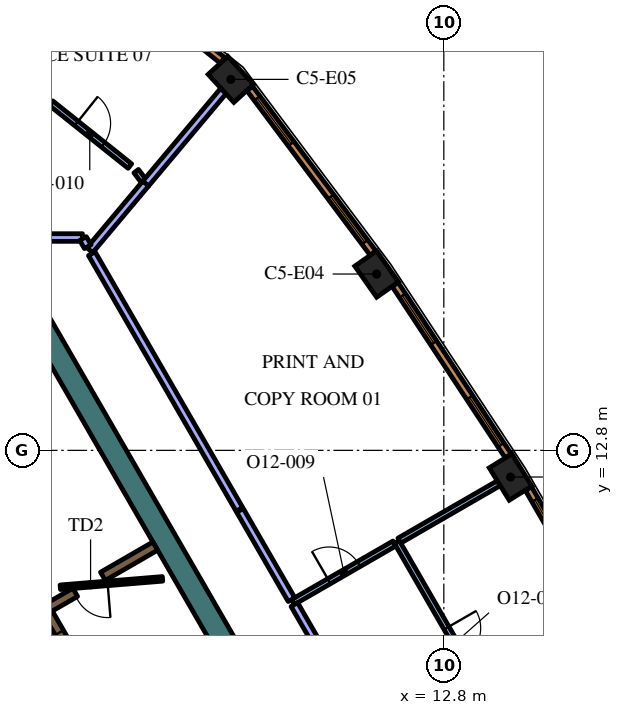
"""IFC4 building model, lengths in metres.
Left out: names, types, materials, properties, quantities, classifications, styles, units other than length and angle.
Written with IfcOpenShell. Run it as: python <this file> out.ifc"""

import sys

from ifc_helpers import new_model, si_unit, direction, frame, frame_2d, origin, origin_2d, place, context, subcontext, project, spatial, rectangle, extrude, element, fill, save


model = new_model("IFC4")
c1 = context("Model", 3, precision=1e-05, world=origin(), true_north=direction((0.0, 1.0)))
c2 = subcontext(c1, "Body", "Model", "MODEL_VIEW")
j1 = project(units=[si_unit("LENGTHUNIT", "METRE"), si_unit("PLANEANGLEUNIT", "RADIAN")], contexts=[c1])
p1 = place(None, origin())
s1 = spatial("IfcSite", under=j1, at=p1, CompositionType="ELEMENT")
p2 = place(p1, origin())
s2 = spatial("IfcBuilding", under=s1, at=p2, CompositionType="ELEMENT")
p3 = place(p2, frame((0.0, 0.0, 279.6)))
s3 = spatial("IfcBuildingStorey", under=s2, at=p3, CompositionType="ELEMENT", Elevation=279.6)
for number, where, z_axis, x_axis in (
    (1, (14.556, 12.098, 0.0), (0.0, 0.0, 1.0), (-0.526, 0.851, 0.0)),
    (2, (11.032, 17.44, 0.0), (0.0, 0.0, 1.0), (-0.575, 0.818, 0.0)),
    (3, (7.195, 22.561, 0.0), (0.0, 0.0, 1.0), (-0.676, 0.737, 0.0)),
):
    element("IfcColumn", number, at=place(p3, frame(where, z_axis=z_axis, x_axis=x_axis)), inside=s3, PredefinedType="COLUMN", context=c2, shape_type="SweptSolid", body=[
        extrude(rectangle(XDim=1.0, YDim=0.7, at=origin_2d()), origin(), (0.0, 0.0, 1.0), 4.2),
    ])
p4 = place(p3, frame((1.989, 16.456, 0.0), z_axis=(0.0, 0.0, 1.0), x_axis=(0.49999102663, -0.8660305845, 0.0)))
e4 = element("IfcWall", 4, at=p4, inside=s3, PredefinedType="SOLIDWALL", context=c2, shape_type="SweptSolid", body=[
    extrude(rectangle(XDim=12.406, YDim=0.6, at=frame_2d((6.203, 0.0))), origin(), (0.0, 0.0, 1.0), 4.2),
])
p5 = place(p3, frame((3.1, 9.064, 0.0), z_axis=(0.0, 0.0, 1.0), x_axis=(-0.866033137035, -0.499986605379, 0.0)))
e5 = element("IfcWall", 5, at=p5, inside=s3, PredefinedType="SOLIDWALL", context=c2, shape_type="SweptSolid", body=[
    extrude(rectangle(XDim=3.467, YDim=0.25, at=frame_2d((1.733, 0.0))), origin(), (0.0, 0.0, 1.0), 4.2),
])
p6 = place(p3, frame((3.83, 9.486, 0.0), z_axis=(0.0, 0.0, 1.0), x_axis=(0.865986202621, 0.500067892261, 0.0)))
e6 = element("IfcWall", 6, at=p6, inside=s3, PredefinedType="SOLIDWALL", context=c2, shape_type="SweptSolid", body=[
    extrude(rectangle(XDim=1.591, YDim=0.25, at=frame_2d((0.795, 0.0))), origin(), (0.0, 0.0, 1.0), 4.2),
])
p7 = place(p3, frame((8.565, -2.185, 0.0), z_axis=(0.0, 0.0, 1.0), x_axis=(-0.499997954832, 0.866026584559, 0.0)))
e7 = element("IfcWall", 7, at=p7, inside=s3, PredefinedType="SOLIDWALL", context=c2, shape_type="SweptSolid", body=[
    extrude(rectangle(XDim=12.35, YDim=0.25, at=frame_2d((6.175, 0.0))), origin(), (0.0, 0.0, 1.0), 4.2),
])
p8 = place(p7, frame((0.685, 0.0, 0.0)))
e8 = element("IfcOpeningElement", 8, at=p8, cuts=e7, PredefinedType="OPENING", context=c2, shape_type="SweptSolid", body=[
    extrude(rectangle(XDim=0.9, YDim=2.1, at=frame_2d((0.45, 1.05))), frame((0.0, 0.135, 0.0), z_axis=(0.0, -1.0, 0.0), x_axis=(1.0, 0.0, 0.0)), (0.0, 0.0, 1.0), 0.27),
])
p9 = place(p7, frame((3.105, 0.0, 0.0)))
e9 = element("IfcOpeningElement", 9, at=p9, cuts=e7, PredefinedType="OPENING", context=c2, shape_type="SweptSolid", body=[
    extrude(rectangle(XDim=1.1, YDim=2.1, at=frame_2d((0.55, 1.05))), frame((0.0, 0.135, 0.0), z_axis=(0.0, -1.0, 0.0), x_axis=(1.0, 0.0, 0.0)), (0.0, 0.0, 1.0), 0.27),
])
p10 = place(p7, frame((5.625, 0.0, 0.0)))
e10 = element("IfcOpeningElement", 10, at=p10, cuts=e7, PredefinedType="OPENING", context=c2, shape_type="SweptSolid", body=[
    extrude(rectangle(XDim=1.1, YDim=2.1, at=frame_2d((0.55, 1.05))), frame((0.0, 0.135, 0.0), z_axis=(0.0, -1.0, 0.0), x_axis=(1.0, 0.0, 0.0)), (0.0, 0.0, 1.0), 0.27),
])
p11 = place(p7, frame((8.145, 0.0, 0.0)))
e11 = element("IfcOpeningElement", 11, at=p11, cuts=e7, PredefinedType="OPENING", context=c2, shape_type="SweptSolid", body=[
    extrude(rectangle(XDim=1.1, YDim=2.1, at=frame_2d((0.55, 1.05))), frame((0.0, 0.135, 0.0), z_axis=(0.0, -1.0, 0.0), x_axis=(1.0, 0.0, 0.0)), (0.0, 0.0, 1.0), 0.27),
])
p12 = place(p7, frame((10.665, 0.0, 0.0)))
e12 = element("IfcOpeningElement", 12, at=p12, cuts=e7, PredefinedType="OPENING", context=c2, shape_type="SweptSolid", body=[
    extrude(rectangle(XDim=1.1, YDim=2.1, at=frame_2d((0.55, 1.05))), frame((0.0, 0.135, 0.0), z_axis=(0.0, -1.0, 0.0), x_axis=(1.0, 0.0, 0.0)), (0.0, 0.0, 1.0), 0.27),
])
p13 = place(p3, frame((5.398, 9.419, 0.0), z_axis=(0.0, 0.0, 1.0), x_axis=(-0.996653416376, -0.081743303248, 0.0)))
e13 = element("IfcWall", 13, at=p13, inside=s3, PredefinedType="PARTITIONING", context=c2, shape_type="SweptSolid", body=[
    extrude(rectangle(XDim=2.7, YDim=0.12, at=frame_2d((1.35, 0.0))), origin(), (0.0, 0.0, 1.0), 3.55),
])
p14 = place(p13, frame((1.45, 0.0, 0.0)))
e14 = element("IfcOpeningElement", 14, at=p14, cuts=e13, PredefinedType="OPENING", context=c2, shape_type="SweptSolid", body=[
    extrude(rectangle(XDim=0.9, YDim=2.1, at=frame_2d((0.45, 1.05))), frame((0.0, 0.07, 0.0), z_axis=(0.0, -1.0, 0.0), x_axis=(1.0, 0.0, 0.0)), (0.0, 0.0, 1.0), 0.14),
])
p15 = place(p3, frame((11.564, 10.387, 0.0), z_axis=(0.0, 0.0, 1.0), x_axis=(0.500002559113, -0.866023926275, 0.0)))
e15 = element("IfcWall", 15, at=p15, inside=s3, PredefinedType="PARTITIONING", context=c2, shape_type="SweptSolid", body=[
    extrude(rectangle(XDim=6.212, YDim=0.15, at=frame_2d((3.106, 0.0))), origin(), (0.0, 0.0, 1.0), 3.55),
])
p16 = place(p15, frame((2.612, 0.0, 0.0)))
e16 = element("IfcOpeningElement", 16, at=p16, cuts=e15, PredefinedType="OPENING", context=c2, shape_type="SweptSolid", body=[
    extrude(rectangle(XDim=0.9, YDim=2.1, at=frame_2d((0.45, 1.05))), frame((0.0, 0.085, 0.0), z_axis=(0.0, -1.0, 0.0), x_axis=(1.0, 0.0, 0.0)), (0.0, 0.0, 1.0), 0.17),
])
p17 = place(p3, frame((11.629, 10.424, 0.0), z_axis=(0.0, 0.0, 1.0), x_axis=(0.866061796884, 0.499936960004, 0.0)))
e17 = element("IfcWall", 17, at=p17, inside=s3, PredefinedType="PARTITIONING", context=c2, shape_type="SweptSolid", body=[
    extrude(rectangle(XDim=3.021, YDim=0.15, at=frame_2d((1.511, 0.0))), origin(), (0.0, 0.0, 1.0), 3.55),
])
p18 = place(p3, frame((8.829, 8.808, 0.0), z_axis=(0.0, 0.0, 1.0), x_axis=(0.866041857893, 0.499971499565, 0.0)))
e18 = element("IfcWall", 18, at=p18, inside=s3, PredefinedType="PARTITIONING", context=c2, shape_type="SweptSolid", body=[
    extrude(rectangle(XDim=3.083, YDim=0.15, at=frame_2d((1.542, 0.0))), origin(), (0.0, 0.0, 1.0), 3.55),
])
p19 = place(p18, frame((1.1, 0.0, 0.0)))
e19 = element("IfcOpeningElement", 19, at=p19, cuts=e18, PredefinedType="OPENING", context=c2, shape_type="SweptSolid", body=[
    extrude(rectangle(XDim=0.9, YDim=2.1, at=frame_2d((0.45, 1.05))), frame((0.0, 0.085, 0.0), z_axis=(0.0, -1.0, 0.0), x_axis=(1.0, 0.0, 0.0)), (0.0, 0.0, 1.0), 0.17),
])
p20 = place(p3, frame((13.436, 0.829, 0.0), z_axis=(0.0, 0.0, 1.0), x_axis=(-0.499983789798, 0.866034762547, 0.0)))
e20 = element("IfcWall", 20, at=p20, inside=s3, PredefinedType="PARTITIONING", context=c2, shape_type="SweptSolid", body=[
    extrude(rectangle(XDim=9.138, YDim=0.2, at=frame_2d((4.569, 0.0))), origin(), (0.0, 0.0, 1.0), 3.55),
])
p21 = place(p3, frame((4.95, 19.814, 0.0), z_axis=(0.0, 0.0, 1.0), x_axis=(0.642981953866, 0.765881326971, 0.0)))
e21 = element("IfcWall", 21, at=p21, inside=s3, PredefinedType="PARTITIONING", context=c2, shape_type="SweptSolid", body=[
    extrude(rectangle(XDim=3.188, YDim=0.2, at=frame_2d((1.594, 0.0))), origin(), (0.0, 0.0, 1.0), 3.55),
])
p22 = place(p3, frame((3.483, 18.067, 0.0), z_axis=(0.0, 0.0, 1.0), x_axis=(0.642896944312, 0.765952687177, 0.0)))
e22 = element("IfcWall", 22, at=p22, inside=s3, PredefinedType="PARTITIONING", context=c2, shape_type="SweptSolid", body=[
    extrude(rectangle(XDim=2.29, YDim=0.2, at=frame_2d((1.145, 0.0))), origin(), (0.0, 0.0, 1.0), 3.55),
])
p23 = place(p3, frame((8.792, 8.873, 0.0), z_axis=(0.0, 0.0, 1.0), x_axis=(-0.499992600721, 0.866029675718, 0.0)))
e23 = element("IfcWall", 23, at=p23, inside=s3, PredefinedType="PARTITIONING", context=c2, shape_type="SweptSolid", body=[
    extrude(rectangle(XDim=2.712, YDim=0.2, at=frame_2d((1.356, 0.0))), origin(), (0.0, 0.0, 1.0), 3.55),
])
p24 = place(p3, frame((7.421, 11.247, 0.0), z_axis=(0.0, 0.0, 1.0), x_axis=(-0.499999024953, 0.866025966727, 0.0)))
e24 = element("IfcWall", 24, at=p24, inside=s3, PredefinedType="PARTITIONING", context=c2, shape_type="SweptSolid", body=[
    extrude(rectangle(XDim=7.769, YDim=0.2, at=frame_2d((3.884, 0.0))), origin(), (0.0, 0.0, 1.0), 3.55),
])
p25 = place(p3, frame((4.891, 19.899, 0.0), z_axis=(0.0, 0.0, 1.0), x_axis=(-0.6, 0.8, 0.0)))
e25 = element("IfcWall", 25, at=p25, inside=s3, PredefinedType="PARTITIONING", context=c2, shape_type="SweptSolid", body=[
    extrude(rectangle(XDim=0.309, YDim=0.15, at=frame_2d((0.154, 0.0))), origin(), (0.0, 0.0, 1.0), 3.55),
])
p26 = place(p3, frame((2.462, 21.937, 0.0), z_axis=(0.0, 0.0, 1.0), x_axis=(0.781630346222, -0.62374193531, 0.0)))
e26 = element("IfcWall", 26, at=p26, inside=s3, PredefinedType="PARTITIONING", context=c2, shape_type="SweptSolid", body=[
    extrude(rectangle(XDim=2.656, YDim=0.15, at=frame_2d((1.328, 0.0))), origin(), (0.0, 0.0, 1.0), 3.55),
])
p27 = place(p26, frame((0.857, 0.0, 0.0)))
e27 = element("IfcOpeningElement", 27, at=p27, cuts=e26, PredefinedType="OPENING", context=c2, shape_type="SweptSolid", body=[
    extrude(rectangle(XDim=0.9, YDim=2.1, at=frame_2d((0.45, 1.05))), frame((0.0, 0.085, 0.0), z_axis=(0.0, -1.0, 0.0), x_axis=(1.0, 0.0, 0.0)), (0.0, 0.0, 1.0), 0.17),
])
p28 = place(p3, frame((3.291, 18.4, 0.0), z_axis=(0.0, 0.0, 1.0), x_axis=(-1.0, 0.0, 0.0)))
e28 = element("IfcWall", 28, at=p28, inside=s3, PredefinedType="PARTITIONING", context=c2, shape_type="SweptSolid", body=[
    extrude(rectangle(XDim=6.582, YDim=0.2, at=frame_2d((3.291, 0.0))), origin(), (0.0, 0.0, 1.0), 3.55),
])
p29 = place(p3, frame((3.43, 18.159, 0.0), z_axis=(0.0, 0.0, 1.0), x_axis=(-0.499949632511, 0.866054481515, 0.0)))
e29 = element("IfcWall", 29, at=p29, inside=s3, PredefinedType="PARTITIONING", context=c2, shape_type="SweptSolid", body=[
    extrude(rectangle(XDim=0.248, YDim=0.2, at=frame_2d((0.124, 0.0))), origin(), (0.0, 0.0, 1.0), 3.55),
])
p30 = place(p3, frame((17.728, 7.114, 0.0), z_axis=(0.0, 0.0, 1.0), x_axis=(-0.500024767483, 0.866011103799, 0.0)))
e30 = element("IfcWall", 30, at=p30, inside=s3, PredefinedType="SOLIDWALL", context=c2, shape_type="SweptSolid", body=[
    extrude(rectangle(XDim=5.406, YDim=0.19, at=frame_2d((2.703, 0.0))), origin(), (0.0, 0.0, 1.0), 3.95),
])
p31 = place(p30, frame((0.346, 0.0, 0.6)))
e31 = element("IfcOpeningElement", 31, at=p31, cuts=e30, PredefinedType="OPENING", context=c2, shape_type="SweptSolid", body=[
    extrude(rectangle(XDim=1.5, YDim=2.85, at=frame_2d((0.75, 1.425))), frame((0.0, 0.105, 0.0), z_axis=(0.0, -1.0, 0.0), x_axis=(1.0, 0.0, 0.0)), (0.0, 0.0, 1.0), 0.21),
])
p32 = place(p30, frame((3.56, 0.0, 0.6)))
e32 = element("IfcOpeningElement", 32, at=p32, cuts=e30, PredefinedType="OPENING", context=c2, shape_type="SweptSolid", body=[
    extrude(rectangle(XDim=1.5, YDim=2.85, at=frame_2d((0.75, 1.425))), frame((0.0, 0.105, 0.0), z_axis=(0.0, -1.0, 0.0), x_axis=(1.0, 0.0, 0.0)), (0.0, 0.0, 1.0), 0.21),
])
p33 = place(p3, frame((14.496, 12.653, 0.0), z_axis=(0.0, 0.0, 1.0), x_axis=(-0.550744054781, 0.83467417962, 0.0)))
e33 = element("IfcWall", 33, at=p33, inside=s3, PredefinedType="SOLIDWALL", context=c2, shape_type="SweptSolid", body=[
    extrude(rectangle(XDim=5.406, YDim=0.19, at=frame_2d((2.703, 0.0))), origin(), (0.0, 0.0, 1.0), 3.95),
])
p34 = place(p33, frame((0.346, 0.0, 0.6)))
e34 = element("IfcOpeningElement", 34, at=p34, cuts=e33, PredefinedType="OPENING", context=c2, shape_type="SweptSolid", body=[
    extrude(rectangle(XDim=1.5, YDim=2.85, at=frame_2d((0.75, 1.425))), frame((0.0, 0.105, 0.0), z_axis=(0.0, -1.0, 0.0), x_axis=(1.0, 0.0, 0.0)), (0.0, 0.0, 1.0), 0.21),
])
p35 = place(p33, frame((3.559, 0.0, 0.6)))
e35 = element("IfcOpeningElement", 35, at=p35, cuts=e33, PredefinedType="OPENING", context=c2, shape_type="SweptSolid", body=[
    extrude(rectangle(XDim=1.5, YDim=2.85, at=frame_2d((0.75, 1.425))), frame((0.0, 0.105, 0.0), z_axis=(0.0, -1.0, 0.0), x_axis=(1.0, 0.0, 0.0)), (0.0, 0.0, 1.0), 0.21),
])
p36 = place(p3, frame((10.938, 17.99, 0.0), z_axis=(0.0, 0.0, 1.0), x_axis=(-0.599559865294, 0.800329911929, 0.0)))
e36 = element("IfcWall", 36, at=p36, inside=s3, PredefinedType="SOLIDWALL", context=c2, shape_type="SweptSolid", body=[
    extrude(rectangle(XDim=5.415, YDim=0.19, at=frame_2d((2.708, 0.0))), origin(), (0.0, 0.0, 1.0), 3.95),
])
p37 = place(p36, frame((0.358, 0.0, 0.6)))
e37 = element("IfcOpeningElement", 37, at=p37, cuts=e36, PredefinedType="OPENING", context=c2, shape_type="SweptSolid", body=[
    extrude(rectangle(XDim=1.5, YDim=2.85, at=frame_2d((0.75, 1.425))), frame((0.0, 0.105, 0.0), z_axis=(0.0, -1.0, 0.0), x_axis=(1.0, 0.0, 0.0)), (0.0, 0.0, 1.0), 0.21),
])
p38 = place(p36, frame((3.593, 0.0, 0.6)))
e38 = element("IfcOpeningElement", 38, at=p38, cuts=e36, PredefinedType="OPENING", context=c2, shape_type="SweptSolid", body=[
    extrude(rectangle(XDim=1.5, YDim=2.85, at=frame_2d((0.75, 1.425))), frame((0.0, 0.105, 0.0), z_axis=(0.0, -1.0, 0.0), x_axis=(1.0, 0.0, 0.0)), (0.0, 0.0, 1.0), 0.21),
])
p39 = place(p3, frame((6.977, 23.061, 0.0), z_axis=(0.0, 0.0, 1.0), x_axis=(-0.781626234064, 0.623747088349, 0.0)))
e39 = element("IfcWall", 39, at=p39, inside=s3, PredefinedType="SOLIDWALL", context=c2, shape_type="SweptSolid", body=[
    extrude(rectangle(XDim=3.237, YDim=0.19, at=frame_2d((1.618, 0.0))), origin(), (0.0, 0.0, 1.0), 3.95),
])
p40 = place(p39, frame((1.068, 0.0, 0.6)))
e40 = element("IfcOpeningElement", 40, at=p40, cuts=e39, PredefinedType="OPENING", context=c2, shape_type="SweptSolid", body=[
    extrude(rectangle(XDim=1.1, YDim=2.85, at=frame_2d((0.55, 1.425))), frame((0.0, 0.105, 0.0), z_axis=(0.0, -1.0, 0.0), x_axis=(1.0, 0.0, 0.0)), (0.0, 0.0, 1.0), 0.21),
])
p41 = place(p12, origin())
e41 = element("IfcDoor", 41, at=p41, inside=s3, OperationType="DOUBLE_DOOR_SLIDING", PredefinedType="DOOR", context=c2, shape_type="SweptSolid", body=[
    extrude(rectangle(XDim=1.1, YDim=2.1, at=frame_2d((0.55, 1.05))), frame((0.0, 0.025, 0.0), z_axis=(0.0, -1.0, 0.0), x_axis=(1.0, 0.0, 0.0)), (0.0, 0.0, 1.0), 0.05),
])
fill(e12, e41)
p42 = place(p14, origin())
e42 = element("IfcDoor", 42, at=p42, inside=s3, OperationType="SINGLE_SWING_LEFT", PredefinedType="DOOR", context=c2, shape_type="SweptSolid", body=[
    extrude(rectangle(XDim=0.9, YDim=2.1, at=frame_2d((0.45, 1.05))), frame((0.0, 0.025, 0.0), z_axis=(0.0, -1.0, 0.0), x_axis=(1.0, 0.0, 0.0)), (0.0, 0.0, 1.0), 0.05),
])
fill(e14, e42)
p43 = place(p16, origin())
e43 = element("IfcDoor", 43, at=p43, inside=s3, OperationType="SINGLE_SWING_LEFT", PredefinedType="DOOR", context=c2, shape_type="SweptSolid", body=[
    extrude(rectangle(XDim=0.9, YDim=2.1, at=frame_2d((0.45, 1.05))), frame((0.0, 0.025, 0.0), z_axis=(0.0, -1.0, 0.0), x_axis=(1.0, 0.0, 0.0)), (0.0, 0.0, 1.0), 0.05),
])
fill(e16, e43)
p44 = place(p19, origin())
e44 = element("IfcDoor", 44, at=p44, inside=s3, OperationType="SINGLE_SWING_RIGHT", PredefinedType="DOOR", context=c2, shape_type="SweptSolid", body=[
    extrude(rectangle(XDim=0.9, YDim=2.1, at=frame_2d((0.45, 1.05))), frame((0.0, 0.025, 0.0), z_axis=(0.0, -1.0, 0.0), x_axis=(1.0, 0.0, 0.0)), (0.0, 0.0, 1.0), 0.05),
])
fill(e19, e44)
p45 = place(p27, origin())
e45 = element("IfcDoor", 45, at=p45, inside=s3, OperationType="SINGLE_SWING_LEFT", PredefinedType="DOOR", context=c2, shape_type="SweptSolid", body=[
    extrude(rectangle(XDim=0.9, YDim=2.1, at=frame_2d((0.45, 1.05))), frame((0.0, 0.025, 0.0), z_axis=(0.0, -1.0, 0.0), x_axis=(1.0, 0.0, 0.0)), (0.0, 0.0, 1.0), 0.05),
])
fill(e27, e45)
p46 = place(p32, origin())
e46 = element("IfcWindow", 46, at=p46, inside=s3, PartitioningType="SINGLE_PANEL", PredefinedType="WINDOW", context=c2, shape_type="SweptSolid", body=[
    extrude(rectangle(XDim=1.5, YDim=2.85, at=frame_2d((0.75, 1.425))), frame((0.0, 0.045, 0.0), z_axis=(0.0, -1.0, 0.0), x_axis=(1.0, 0.0, 0.0)), (0.0, 0.0, 1.0), 0.06),
])
fill(e32, e46)
p47 = place(p34, origin())
e47 = element("IfcWindow", 47, at=p47, inside=s3, PartitioningType="SINGLE_PANEL", PredefinedType="WINDOW", context=c2, shape_type="SweptSolid", body=[
    extrude(rectangle(XDim=1.5, YDim=2.85, at=frame_2d((0.75, 1.425))), frame((0.0, 0.045, 0.0), z_axis=(0.0, -1.0, 0.0), x_axis=(1.0, 0.0, 0.0)), (0.0, 0.0, 1.0), 0.06),
])
fill(e34, e47)
p48 = place(p35, origin())
e48 = element("IfcWindow", 48, at=p48, inside=s3, PartitioningType="SINGLE_PANEL", PredefinedType="WINDOW", context=c2, shape_type="SweptSolid", body=[
    extrude(rectangle(XDim=1.5, YDim=2.85, at=frame_2d((0.75, 1.425))), frame((0.0, 0.045, 0.0), z_axis=(0.0, -1.0, 0.0), x_axis=(1.0, 0.0, 0.0)), (0.0, 0.0, 1.0), 0.06),
])
fill(e35, e48)
p49 = place(p37, origin())
e49 = element("IfcWindow", 49, at=p49, inside=s3, PartitioningType="SINGLE_PANEL", PredefinedType="WINDOW", context=c2, shape_type="SweptSolid", body=[
    extrude(rectangle(XDim=1.5, YDim=2.85, at=frame_2d((0.75, 1.425))), frame((0.0, 0.045, 0.0), z_axis=(0.0, -1.0, 0.0), x_axis=(1.0, 0.0, 0.0)), (0.0, 0.0, 1.0), 0.06),
])
fill(e37, e49)
p50 = place(p38, origin())
e50 = element("IfcWindow", 50, at=p50, inside=s3, PartitioningType="SINGLE_PANEL", PredefinedType="WINDOW", context=c2, shape_type="SweptSolid", body=[
    extrude(rectangle(XDim=1.5, YDim=2.85, at=frame_2d((0.75, 1.425))), frame((0.0, 0.045, 0.0), z_axis=(0.0, -1.0, 0.0), x_axis=(1.0, 0.0, 0.0)), (0.0, 0.0, 1.0), 0.06),
])
fill(e38, e50)
save(model, sys.argv[1])
